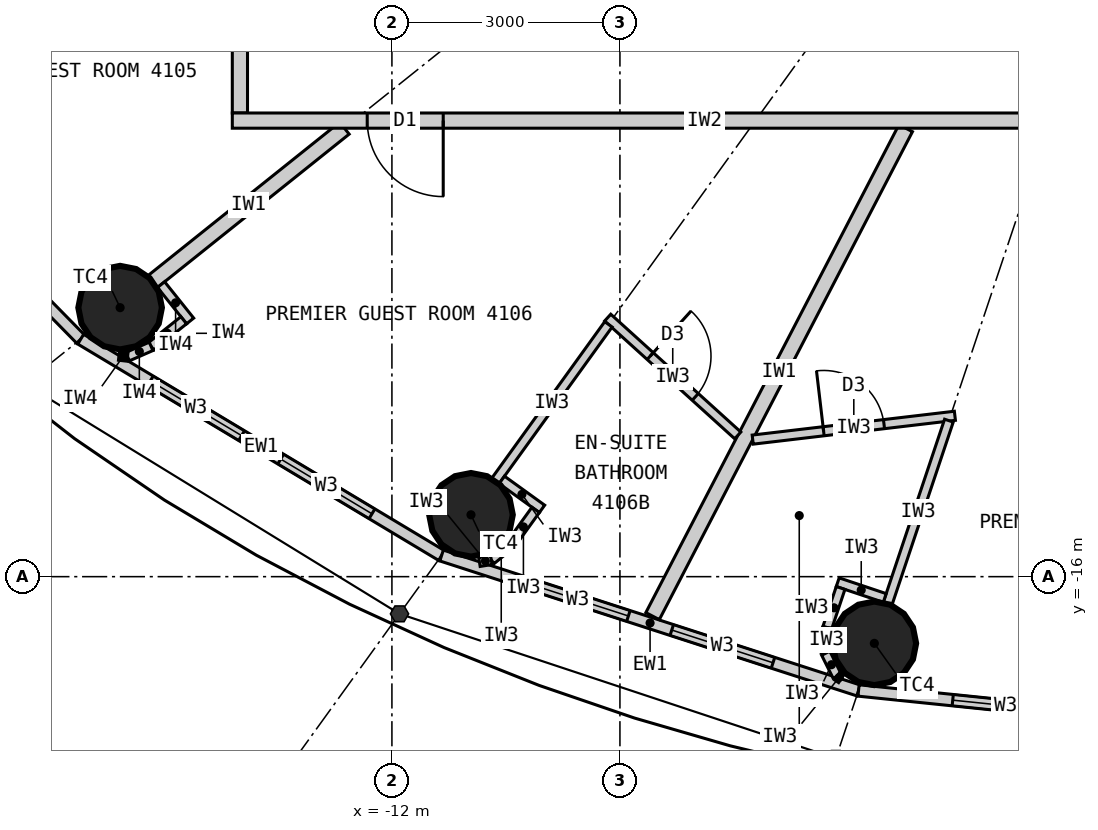
"""IFC4 building model, lengths in metres.
Left out: names, types, materials, properties, quantities, classifications, styles, units other than length and angle.
Written with IfcOpenShell. Run it as: python <this file> out.ifc"""

import sys

from ifc_helpers import new_model, si_unit, direction, frame, frame_2d, origin, origin_2d, place, context, subcontext, project, spatial, rectangle, circle, extrude, element, fill, save


model = new_model("IFC4")
c1 = context("Model", 3, precision=1e-05, world=origin(), true_north=direction((0.0, 1.0)))
c2 = subcontext(c1, "Body", "Model", "MODEL_VIEW")
j1 = project(units=[si_unit("LENGTHUNIT", "METRE"), si_unit("PLANEANGLEUNIT", "RADIAN")], contexts=[c1])
p1 = place(None, origin())
s1 = spatial("IfcSite", under=j1, at=p1, CompositionType="ELEMENT")
p2 = place(p1, origin())
s2 = spatial("IfcBuilding", under=s1, at=p2, CompositionType="ELEMENT")
p3 = place(p2, frame((0.0, 0.0, 156.6)))
s3 = spatial("IfcBuildingStorey", under=s2, at=p3, CompositionType="ELEMENT", Elevation=156.6)
for number, where, z_axis, x_axis in (
    (1, (-15.576, -12.461, 0.0), (0.0, 0.0, 1.0), (1.0, 0.0, 0.0)),
    (2, (-10.96, -15.186, 0.0), (0.0, 0.0, 1.0), (1.0, 0.0, 0.0)),
    (3, (-5.653, -16.877, 0.0), (0.0, 0.0, 1.0), (1.0, 0.0, 0.0)),
):
    element("IfcColumn", number, at=place(p3, frame(where, z_axis=z_axis, x_axis=x_axis)), inside=s3, PredefinedType="COLUMN", context=c2, shape_type="SweptSolid", body=[
        extrude(circle(Radius=0.55, at=origin_2d()), origin(), (0.0, 0.0, 1.0), 3.3),
    ])
p4 = place(p3, frame((-19.772, -9.132, 0.0), z_axis=(0.0, 0.0, 1.0), x_axis=(0.700727467776, -0.71342905457, 0.0)))
e4 = element("IfcWall", 4, at=p4, inside=s3, PredefinedType="ELEMENTEDWALL", context=c2, shape_type="SweptSolid", body=[
    extrude(rectangle(XDim=5.247, YDim=0.15, at=frame_2d((2.624, 0.0))), origin(), (0.0, 0.0, 1.0), 3.12),
])
p5 = place(p4, frame((0.924, 0.0, 0.9)))
e5 = element("IfcOpeningElement", 5, at=p5, cuts=e4, PredefinedType="OPENING", context=c2, shape_type="SweptSolid", body=[
    extrude(rectangle(XDim=1.4, YDim=1.9, at=frame_2d((0.7, 0.95))), frame((0.0, 0.085, 0.0), z_axis=(0.0, -1.0, 0.0), x_axis=(1.0, 0.0, 0.0)), (0.0, 0.0, 1.0), 0.17),
])
p6 = place(p4, frame((2.924, 0.0, 0.9)))
e6 = element("IfcOpeningElement", 6, at=p6, cuts=e4, PredefinedType="OPENING", context=c2, shape_type="SweptSolid", body=[
    extrude(rectangle(XDim=1.4, YDim=1.9, at=frame_2d((0.7, 0.95))), frame((0.0, 0.085, 0.0), z_axis=(0.0, -1.0, 0.0), x_axis=(1.0, 0.0, 0.0)), (0.0, 0.0, 1.0), 0.17),
])
p7 = place(p3, frame((-16.095, -12.876, 0.0), z_axis=(0.0, 0.0, 1.0), x_axis=(0.857695199231, -0.514158482587, 0.0)))
e7 = element("IfcWall", 7, at=p7, inside=s3, PredefinedType="ELEMENTEDWALL", context=c2, shape_type="SweptSolid", body=[
    extrude(rectangle(XDim=5.536, YDim=0.15, at=frame_2d((2.768, 0.0))), origin(), (0.0, 0.0, 1.0), 3.12),
])
p8 = place(p7, frame((1.068, 0.0, 0.9)))
e8 = element("IfcOpeningElement", 8, at=p8, cuts=e7, PredefinedType="OPENING", context=c2, shape_type="SweptSolid", body=[
    extrude(rectangle(XDim=1.4, YDim=1.9, at=frame_2d((0.7, 0.95))), frame((0.0, 0.085, 0.0), z_axis=(0.0, -1.0, 0.0), x_axis=(1.0, 0.0, 0.0)), (0.0, 0.0, 1.0), 0.17),
])
p9 = place(p7, frame((3.068, 0.0, 0.9)))
e9 = element("IfcOpeningElement", 9, at=p9, cuts=e7, PredefinedType="OPENING", context=c2, shape_type="SweptSolid", body=[
    extrude(rectangle(XDim=1.4, YDim=1.9, at=frame_2d((0.7, 0.95))), frame((0.0, 0.085, 0.0), z_axis=(0.0, -1.0, 0.0), x_axis=(1.0, 0.0, 0.0)), (0.0, 0.0, 1.0), 0.17),
])
p10 = place(p3, frame((-11.346, -15.722, 0.0), z_axis=(0.0, 0.0, 1.0), x_axis=(0.951432482129, -0.307857486429, 0.0)))
e10 = element("IfcWall", 10, at=p10, inside=s3, PredefinedType="ELEMENTEDWALL", context=c2, shape_type="SweptSolid", body=[
    extrude(rectangle(XDim=5.766, YDim=0.15, at=frame_2d((2.883, 0.0))), origin(), (0.0, 0.0, 1.0), 3.12),
])
p11 = place(p10, frame((1.183, 0.0, 0.9)))
e11 = element("IfcOpeningElement", 11, at=p11, cuts=e10, PredefinedType="OPENING", context=c2, shape_type="SweptSolid", body=[
    extrude(rectangle(XDim=1.4, YDim=1.9, at=frame_2d((0.7, 0.95))), frame((0.0, 0.085, 0.0), z_axis=(0.0, -1.0, 0.0), x_axis=(1.0, 0.0, 0.0)), (0.0, 0.0, 1.0), 0.17),
])
p12 = place(p10, frame((3.183, 0.0, 0.9)))
e12 = element("IfcOpeningElement", 12, at=p12, cuts=e10, PredefinedType="OPENING", context=c2, shape_type="SweptSolid", body=[
    extrude(rectangle(XDim=1.4, YDim=1.9, at=frame_2d((0.7, 0.95))), frame((0.0, 0.085, 0.0), z_axis=(0.0, -1.0, 0.0), x_axis=(1.0, 0.0, 0.0)), (0.0, 0.0, 1.0), 0.17),
])
p13 = place(p3, frame((-5.86, -17.497, 0.0), z_axis=(0.0, 0.0, 1.0), x_axis=(0.994751738032, -0.102318032045, 0.0)))
e13 = element("IfcWall", 13, at=p13, inside=s3, PredefinedType="ELEMENTEDWALL", context=c2, shape_type="SweptSolid", body=[
    extrude(rectangle(XDim=5.891, YDim=0.15, at=frame_2d((2.946, 0.0))), origin(), (0.0, 0.0, 1.0), 3.12),
])
p14 = place(p13, frame((1.246, 0.0, 0.9)))
e14 = element("IfcOpeningElement", 14, at=p14, cuts=e13, PredefinedType="OPENING", context=c2, shape_type="SweptSolid", body=[
    extrude(rectangle(XDim=1.4, YDim=1.9, at=frame_2d((0.7, 0.95))), frame((0.0, 0.085, 0.0), z_axis=(0.0, -1.0, 0.0), x_axis=(1.0, 0.0, 0.0)), (0.0, 0.0, 1.0), 0.17),
])
p15 = place(p13, frame((3.246, 0.0, 0.9)))
e15 = element("IfcOpeningElement", 15, at=p15, cuts=e13, PredefinedType="OPENING", context=c2, shape_type="SweptSolid", body=[
    extrude(rectangle(XDim=1.4, YDim=1.9, at=frame_2d((0.7, 0.95))), frame((0.0, 0.085, 0.0), z_axis=(0.0, -1.0, 0.0), x_axis=(1.0, 0.0, 0.0)), (0.0, 0.0, 1.0), 0.17),
])
p16 = place(p3, frame((-12.625, -10.1, 0.0), z_axis=(0.0, 0.0, 1.0), x_axis=(-0.780876185034, -0.624685827954, 0.0)))
e16 = element("IfcWall", 16, at=p16, inside=s3, PredefinedType="PARTITIONING", context=c2, shape_type="SweptSolid", body=[
    extrude(rectangle(XDim=3.229, YDim=0.2, at=frame_2d((1.615, 0.0))), origin(), (0.0, 0.0, 1.0), 2.42),
])
p17 = place(p3, frame((-5.24, -10.1, 0.0), z_axis=(0.0, 0.0, 1.0), x_axis=(-0.460532965373, -0.887642601391, 0.0)))
e17 = element("IfcWall", 17, at=p17, inside=s3, PredefinedType="PARTITIONING", context=c2, shape_type="SweptSolid", body=[
    extrude(rectangle(XDim=7.231, YDim=0.2, at=frame_2d((3.616, 0.0))), origin(), (0.0, 0.0, 1.0), 3.12),
])
p18 = place(p3, frame((-7.45, -14.142, 0.0), z_axis=(0.0, 0.0, 1.0), x_axis=(-0.74113984586, 0.671350675041, 0.0)))
e18 = element("IfcWall", 18, at=p18, inside=s3, PredefinedType="PARTITIONING", context=c2, shape_type="SweptSolid", body=[
    extrude(rectangle(XDim=2.309, YDim=0.12, at=frame_2d((1.154, 0.0))), origin(), (0.0, 0.0, 1.0), 3.12),
])
p19 = place(p18, frame((0.754, 0.0, 0.0)))
e19 = element("IfcOpeningElement", 19, at=p19, cuts=e18, PredefinedType="OPENING", context=c2, shape_type="SweptSolid", body=[
    extrude(rectangle(XDim=0.8, YDim=2.1, at=frame_2d((0.4, 1.05))), frame((0.0, 0.07, 0.0), z_axis=(0.0, -1.0, 0.0), x_axis=(1.0, 0.0, 0.0)), (0.0, 0.0, 1.0), 0.14),
])
p20 = place(p3, frame((-9.151, -12.681, 0.0), z_axis=(0.0, 0.0, 1.0), x_axis=(-0.585258912334, -0.8108464747, 0.0)))
e20 = element("IfcWall", 20, at=p20, inside=s3, PredefinedType="PARTITIONING", context=c2, shape_type="SweptSolid", body=[
    extrude(rectangle(XDim=2.54, YDim=0.12, at=frame_2d((1.27, 0.0))), origin(), (0.0, 0.0, 1.0), 2.42),
])
p21 = place(p3, frame((-10.554, -14.727, 0.0), z_axis=(0.0, 0.0, 1.0), x_axis=(0.811044231224, -0.584984833135, 0.0)))
e21 = element("IfcWall", 21, at=p21, inside=s3, PredefinedType="PARTITIONING", context=c2, shape_type="SweptSolid", body=[
    extrude(rectangle(XDim=0.652, YDim=0.12, at=frame_2d((0.326, 0.0))), origin(), (0.0, 0.0, 1.0), 3.12),
])
p22 = place(p3, frame((-10.109, -15.122, 0.0), z_axis=(0.0, 0.0, 1.0), x_axis=(-0.585344718358, -0.810784534072, 0.0)))
e22 = element("IfcWall", 22, at=p22, inside=s3, PredefinedType="PARTITIONING", context=c2, shape_type="SweptSolid", body=[
    extrude(rectangle(XDim=0.55, YDim=0.12, at=frame_2d((0.275, 0.0))), origin(), (0.0, 0.0, 1.0), 3.12),
])
p23 = place(p3, frame((-10.431, -15.568, 0.0), z_axis=(0.0, 0.0, 1.0), x_axis=(-0.77505137267, -0.631898227345, 0.0)))
e23 = element("IfcWall", 23, at=p23, inside=s3, PredefinedType="PARTITIONING", context=c2, shape_type="SweptSolid", body=[
    extrude(rectangle(XDim=0.338, YDim=0.12, at=frame_2d((0.169, 0.0))), origin(), (0.0, 0.0, 1.0), 3.12),
])
p24 = place(p3, frame((-10.693, -15.781, 0.0), z_axis=(0.0, 0.0, 1.0), x_axis=(-0.987256785332, -0.159135287777, 0.0)))
e24 = element("IfcWall", 24, at=p24, inside=s3, PredefinedType="PARTITIONING", context=c2, shape_type="SweptSolid", body=[
    extrude(rectangle(XDim=0.158, YDim=0.12, at=frame_2d((0.079, 0.0))), origin(), (0.0, 0.0, 1.0), 3.12),
])
p25 = place(p3, frame((-7.253, -14.197, 0.0), z_axis=(0.0, 0.0, 1.0), x_axis=(0.993128188393, 0.117031625725, 0.0)))
e25 = element("IfcWall", 25, at=p25, inside=s3, PredefinedType="PARTITIONING", context=c2, shape_type="SweptSolid", body=[
    extrude(rectangle(XDim=2.678, YDim=0.12, at=frame_2d((1.339, 0.0))), origin(), (0.0, 0.0, 1.0), 3.12),
])
p26 = place(p25, frame((0.939, 0.0, 0.0)))
e26 = element("IfcOpeningElement", 26, at=p26, cuts=e25, PredefinedType="OPENING", context=c2, shape_type="SweptSolid", body=[
    extrude(rectangle(XDim=0.8, YDim=2.1, at=frame_2d((0.4, 1.05))), frame((0.0, 0.07, 0.0), z_axis=(0.0, -1.0, 0.0), x_axis=(1.0, 0.0, 0.0)), (0.0, 0.0, 1.0), 0.14),
])
p27 = place(p3, frame((-4.671, -13.948, 0.0), z_axis=(0.0, 0.0, 1.0), x_axis=(-0.317669167093, -0.948201613729, 0.0)))
e27 = element("IfcWall", 27, at=p27, inside=s3, PredefinedType="PARTITIONING", context=c2, shape_type="SweptSolid", body=[
    extrude(rectangle(XDim=2.54, YDim=0.12, at=frame_2d((1.27, 0.0))), origin(), (0.0, 0.0, 1.0), 2.42),
])
p28 = place(p3, frame((-5.516, -16.28, 0.0), z_axis=(0.0, 0.0, 1.0), x_axis=(-0.948157944392, 0.317799484717, 0.0)))
e28 = element("IfcWall", 28, at=p28, inside=s3, PredefinedType="PARTITIONING", context=c2, shape_type="SweptSolid", body=[
    extrude(rectangle(XDim=0.652, YDim=0.12, at=frame_2d((0.326, 0.0))), origin(), (0.0, 0.0, 1.0), 3.12),
])
p29 = place(p3, frame((-6.097, -16.149, 0.0), z_axis=(0.0, 0.0, 1.0), x_axis=(-0.317292604854, -0.948327687514, 0.0)))
e29 = element("IfcWall", 29, at=p29, inside=s3, PredefinedType="PARTITIONING", context=c2, shape_type="SweptSolid", body=[
    extrude(rectangle(XDim=0.55, YDim=0.12, at=frame_2d((0.275, 0.0))), origin(), (0.0, 0.0, 1.0), 3.12),
])
for number, where, z_axis, x_axis in (
    (30, (-6.271, -16.67, 0.0), (0.0, 0.0, 1.0), (-0.061, -0.998, 0.0)),
    (31, (-6.292, -17.007, 0.0), (0.0, 0.0, 1.0), (0.445, -0.895, 0.0)),
):
    element("IfcWall", number, at=place(p3, frame(where, z_axis=z_axis, x_axis=x_axis)), inside=s3, PredefinedType="PARTITIONING", context=c2, shape_type="SweptSolid", body=[
        extrude(rectangle(XDim=0.338, YDim=0.12, at=frame_2d((0.169, 0.0))), origin(), (0.0, 0.0, 1.0), 3.12),
    ])
p30 = place(p3, frame((-6.142, -17.31, 0.0), z_axis=(0.0, 0.0, 1.0), x_axis=(0.835039693181, -0.550189704386, 0.0)))
e32 = element("IfcWall", 32, at=p30, inside=s3, PredefinedType="PARTITIONING", context=c2, shape_type="SweptSolid", body=[
    extrude(rectangle(XDim=0.062, YDim=0.12, at=frame_2d((0.031, 0.0))), origin(), (0.0, 0.0, 1.0), 3.12),
])
p31 = place(p3, frame((-14.0, -1.67, 0.0), z_axis=(0.0, 0.0, 1.0), x_axis=(0.0, -1.0, 0.0)))
e33 = element("IfcWall", 33, at=p31, inside=s3, PredefinedType="PARTITIONING", context=c2, shape_type="SweptSolid", body=[
    extrude(rectangle(XDim=8.23, YDim=0.2, at=frame_2d((4.115, 0.0))), origin(), (0.0, 0.0, 1.0), 3.12),
])
p32 = place(p31, frame((5.552, 0.0, 0.0)))
e34 = element("IfcOpeningElement", 34, at=p32, cuts=e33, PredefinedType="OPENING", context=c2, shape_type="SweptSolid", body=[
    extrude(rectangle(XDim=1.0, YDim=2.2, at=frame_2d((0.5, 1.1))), frame((0.0, 0.11, 0.0), z_axis=(0.0, -1.0, 0.0), x_axis=(1.0, 0.0, 0.0)), (0.0, 0.0, 1.0), 0.22),
])
p33 = place(p3, frame((-1.67, -10.0, 0.0), z_axis=(0.0, 0.0, 1.0), x_axis=(-1.0, 0.0, 0.0)))
e35 = element("IfcWall", 35, at=p33, inside=s3, PredefinedType="PARTITIONING", context=c2, shape_type="SweptSolid", body=[
    extrude(rectangle(XDim=12.43, YDim=0.2, at=frame_2d((6.215, 0.0))), origin(), (0.0, 0.0, 1.0), 3.12),
])
p34 = place(p33, frame((9.655, 0.0, 0.0)))
e36 = element("IfcOpeningElement", 36, at=p34, cuts=e35, PredefinedType="OPENING", context=c2, shape_type="SweptSolid", body=[
    extrude(rectangle(XDim=1.0, YDim=2.2, at=frame_2d((0.5, 1.1))), frame((0.0, 0.11, 0.0), z_axis=(0.0, -1.0, 0.0), x_axis=(1.0, 0.0, 0.0)), (0.0, 0.0, 1.0), 0.22),
])
p35 = place(p3, frame((-15.037, -12.158, 0.0), z_axis=(0.0, 0.0, 1.0), x_axis=(0.624840920722, -0.78075208856, 0.0)))
e37 = element("IfcWall", 37, at=p35, inside=s3, PredefinedType="PARTITIONING", context=c2, shape_type="SweptSolid", body=[
    extrude(rectangle(XDim=0.612, YDim=0.12, at=frame_2d((0.306, 0.0))), origin(), (0.0, 0.0, 1.0), 3.12),
])
p36 = place(p3, frame((-14.739, -12.627, 0.0), z_axis=(0.0, 0.0, 1.0), x_axis=(-0.780912119987, -0.624640905527, 0.0)))
e38 = element("IfcWall", 38, at=p36, inside=s3, PredefinedType="PARTITIONING", context=c2, shape_type="SweptSolid", body=[
    extrude(rectangle(XDim=0.55, YDim=0.12, at=frame_2d((0.275, 0.0))), origin(), (0.0, 0.0, 1.0), 3.12),
])
p37 = place(p3, frame((-15.169, -12.97, 0.0), z_axis=(0.0, 0.0, 1.0), x_axis=(-0.915974725257, -0.401235968838, 0.0)))
e39 = element("IfcWall", 39, at=p37, inside=s3, PredefinedType="PARTITIONING", context=c2, shape_type="SweptSolid", body=[
    extrude(rectangle(XDim=0.338, YDim=0.12, at=frame_2d((0.169, 0.0))), origin(), (0.0, 0.0, 1.0), 3.12),
])
p38 = place(p3, frame((-15.478, -13.106, 0.0), z_axis=(0.0, 0.0, 1.0), x_axis=(-0.993778813557, 0.111371763588, 0.0)))
e40 = element("IfcWall", 40, at=p38, inside=s3, PredefinedType="PARTITIONING", context=c2, shape_type="SweptSolid", body=[
    extrude(rectangle(XDim=0.114, YDim=0.12, at=frame_2d((0.057, 0.0))), origin(), (0.0, 0.0, 1.0), 3.12),
])
p39 = place(p8, origin())
e41 = element("IfcWindow", 41, at=p39, inside=s3, PartitioningType="SINGLE_PANEL", PredefinedType="WINDOW", context=c2, shape_type="SweptSolid", body=[
    extrude(rectangle(XDim=1.4, YDim=1.9, at=frame_2d((0.7, 0.95))), frame((0.0, 0.03, 0.0), z_axis=(0.0, -1.0, 0.0), x_axis=(1.0, 0.0, 0.0)), (0.0, 0.0, 1.0), 0.06),
])
fill(e8, e41)
p40 = place(p9, origin())
e42 = element("IfcWindow", 42, at=p40, inside=s3, PartitioningType="SINGLE_PANEL", PredefinedType="WINDOW", context=c2, shape_type="SweptSolid", body=[
    extrude(rectangle(XDim=1.4, YDim=1.9, at=frame_2d((0.7, 0.95))), frame((0.0, 0.03, 0.0), z_axis=(0.0, -1.0, 0.0), x_axis=(1.0, 0.0, 0.0)), (0.0, 0.0, 1.0), 0.06),
])
fill(e9, e42)
p41 = place(p11, origin())
e43 = element("IfcWindow", 43, at=p41, inside=s3, PartitioningType="SINGLE_PANEL", PredefinedType="WINDOW", context=c2, shape_type="SweptSolid", body=[
    extrude(rectangle(XDim=1.4, YDim=1.9, at=frame_2d((0.7, 0.95))), frame((0.0, 0.03, 0.0), z_axis=(0.0, -1.0, 0.0), x_axis=(1.0, 0.0, 0.0)), (0.0, 0.0, 1.0), 0.06),
])
fill(e11, e43)
p42 = place(p12, origin())
e44 = element("IfcWindow", 44, at=p42, inside=s3, PartitioningType="SINGLE_PANEL", PredefinedType="WINDOW", context=c2, shape_type="SweptSolid", body=[
    extrude(rectangle(XDim=1.4, YDim=1.9, at=frame_2d((0.7, 0.95))), frame((0.0, 0.03, 0.0), z_axis=(0.0, -1.0, 0.0), x_axis=(1.0, 0.0, 0.0)), (0.0, 0.0, 1.0), 0.06),
])
fill(e12, e44)
p43 = place(p14, origin())
e45 = element("IfcWindow", 45, at=p43, inside=s3, PartitioningType="SINGLE_PANEL", PredefinedType="WINDOW", context=c2, shape_type="SweptSolid", body=[
    extrude(rectangle(XDim=1.4, YDim=1.9, at=frame_2d((0.7, 0.95))), frame((0.0, 0.03, 0.0), z_axis=(0.0, -1.0, 0.0), x_axis=(1.0, 0.0, 0.0)), (0.0, 0.0, 1.0), 0.06),
])
fill(e14, e45)
p44 = place(p19, origin())
e46 = element("IfcDoor", 46, at=p44, inside=s3, OperationType="SINGLE_SWING_RIGHT", PredefinedType="DOOR", context=c2, shape_type="SweptSolid", body=[
    extrude(rectangle(XDim=0.8, YDim=2.1, at=frame_2d((0.4, 1.05))), frame((0.0, 0.025, 0.0), z_axis=(0.0, -1.0, 0.0), x_axis=(1.0, 0.0, 0.0)), (0.0, 0.0, 1.0), 0.05),
])
fill(e19, e46)
p45 = place(p34, origin())
e47 = element("IfcDoor", 47, at=p45, inside=s3, OperationType="SINGLE_SWING_LEFT", PredefinedType="DOOR", context=c2, shape_type="SweptSolid", body=[
    extrude(rectangle(XDim=1.0, YDim=2.2, at=frame_2d((0.5, 1.1))), frame((0.0, 0.025, 0.0), z_axis=(0.0, -1.0, 0.0), x_axis=(1.0, 0.0, 0.0)), (0.0, 0.0, 1.0), 0.05),
])
fill(e36, e47)
p46 = place(p26, origin())
e48 = element("IfcDoor", 48, at=p46, inside=s3, OperationType="SINGLE_SWING_LEFT", PredefinedType="DOOR", context=c2, shape_type="SweptSolid", body=[
    extrude(rectangle(XDim=0.8, YDim=2.1, at=frame_2d((0.4, 1.05))), frame((0.0, 0.025, 0.0), z_axis=(0.0, -1.0, 0.0), x_axis=(1.0, 0.0, 0.0)), (0.0, 0.0, 1.0), 0.05),
])
fill(e26, e48)
save(model, sys.argv[1])
